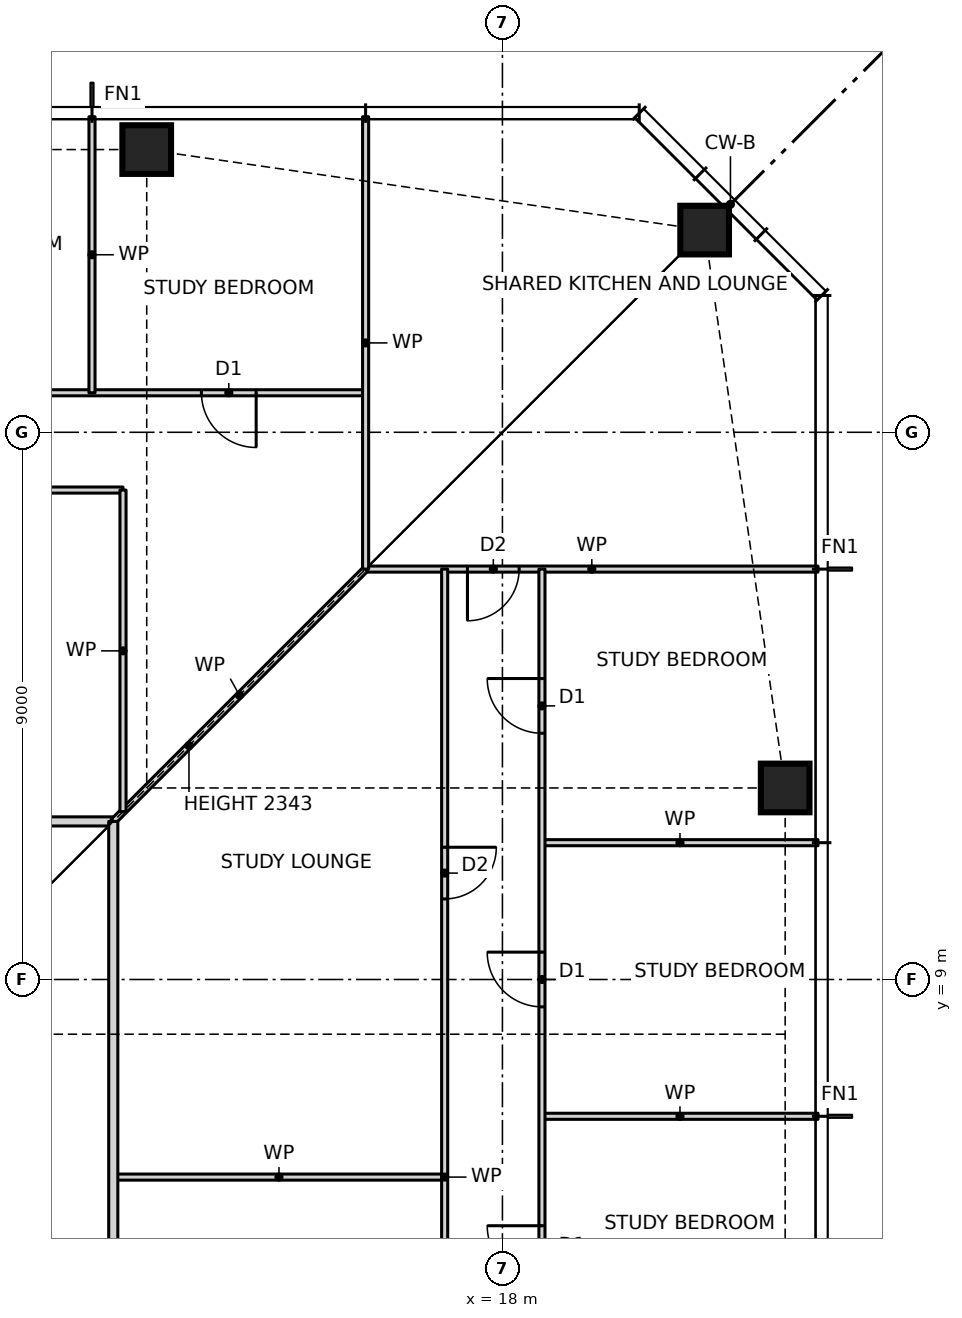
"""IFC4 building model, lengths in metres.
Left out: names, types, materials, properties, quantities, classifications, styles, units other than length and angle.
Written with IfcOpenShell. Run it as: python <this file> out.ifc"""

import sys

from ifc_helpers import new_model, si_unit, direction, frame, frame_2d, origin, origin_2d, place, context, subcontext, project, spatial, rectangle, hollow_rectangle, extrude, element, fill, save


model = new_model("IFC4")
c1 = context("Model", 3, precision=1e-05, world=origin(), true_north=direction((0.0, 1.0)))
c2 = subcontext(c1, "Body", "Model", "MODEL_VIEW")
j1 = project(units=[si_unit("LENGTHUNIT", "METRE"), si_unit("PLANEANGLEUNIT", "RADIAN")], contexts=[c1])
p1 = place(None, origin())
s1 = spatial("IfcSite", under=j1, at=p1, CompositionType="ELEMENT")
p2 = place(p1, origin())
s2 = spatial("IfcBuilding", under=s1, at=p2, CompositionType="ELEMENT")
p3 = place(p2, frame((0.0, 0.0, 50.0)))
s3 = spatial("IfcBuildingStorey", under=s2, at=p3, CompositionType="ELEMENT", Elevation=50.0)
for number, where, z_axis, x_axis in (
    (1, (22.65, 12.15, 0.0), (0.0, 0.0, 1.0), (1.0, 0.0, 0.0)),
    (2, (21.326, 21.326, 0.0), (0.0, 0.0, 1.0), (1.0, 0.0, 0.0)),
    (3, (12.15, 22.65, 0.0), (0.0, 0.0, 1.0), (1.0, 0.0, 0.0)),
):
    element("IfcColumn", number, at=place(p3, frame(where, z_axis=z_axis, x_axis=x_axis)), inside=s3, PredefinedType="COLUMN", context=c2, shape_type="SweptSolid", body=[
        extrude(hollow_rectangle(XDim=0.8, YDim=0.8, WallThickness=0.09, at=origin_2d()), origin(), (0.0, 0.0, 1.0), 3.5),
    ])
p4 = place(p3, frame((11.6, 5.75, 0.0), z_axis=(0.0, 0.0, 1.0), x_axis=(1.0, 0.0, 0.0)))
e4 = element("IfcWall", 4, at=p4, inside=s3, PredefinedType="PARTITIONING", context=c2, shape_type="SweptSolid", body=[
    extrude(rectangle(XDim=5.45, YDim=0.1, at=frame_2d((2.725, 0.0))), origin(), (0.0, 0.0, 1.0), 3.27),
])
for number, where, z_axis, x_axis in (
    (5, (18.65, 6.75, 0.0), (0.0, 0.0, 1.0), (1.0, 0.0, 0.0)),
    (6, (18.65, 11.25, 0.0), (0.0, 0.0, 1.0), (1.0, 0.0, 0.0)),
):
    element("IfcWall", number, at=place(p3, frame(where, z_axis=z_axis, x_axis=x_axis)), inside=s3, PredefinedType="PARTITIONING", context=c2, shape_type="SweptSolid", body=[
        extrude(rectangle(XDim=4.54, YDim=0.1, at=frame_2d((2.27, 0.0))), origin(), (0.0, 0.0, 1.0), 3.27),
    ])
p5 = place(p3, frame((-12.6, 11.6, 0.0), z_axis=(0.0, 0.0, 1.0), x_axis=(1.0, 0.0, 0.0)))
e7 = element("IfcWall", 7, at=p5, inside=s3, PredefinedType="PARTITIONING", context=c2, shape_type="SweptSolid", body=[
    extrude(rectangle(XDim=24.2, YDim=0.15, at=frame_2d((12.1, 0.0))), origin(), (0.0, 0.0, 1.0), 3.27),
])
p6 = place(p5, frame((7.15, 0.0, 0.0)))
e8 = element("IfcOpeningElement", 8, at=p6, cuts=e7, PredefinedType="OPENING", context=c2, shape_type="SweptSolid", body=[
    extrude(rectangle(XDim=1.0, YDim=2.1, at=frame_2d((0.5, 1.05))), frame((0.0, 0.085, 0.0), z_axis=(0.0, -1.0, 0.0), x_axis=(1.0, 0.0, 0.0)), (0.0, 0.0, 1.0), 0.17),
])
p7 = place(p3, frame((15.75, 15.75, 0.0), z_axis=(0.0, 0.0, 1.0), x_axis=(1.0, 0.0, 0.0)))
e9 = element("IfcWall", 9, at=p7, inside=s3, PredefinedType="PARTITIONING", context=c2, shape_type="SweptSolid", body=[
    extrude(rectangle(XDim=7.44, YDim=0.1, at=frame_2d((3.72, 0.0))), origin(), (0.0, 0.0, 1.0), 3.27),
])
p8 = place(p7, frame((1.675, 0.0, 0.0)))
e10 = element("IfcOpeningElement", 10, at=p8, cuts=e9, PredefinedType="OPENING", context=c2, shape_type="SweptSolid", body=[
    extrude(rectangle(XDim=0.85, YDim=2.1, at=frame_2d((0.425, 1.05))), frame((0.0, 0.06, 0.0), z_axis=(0.0, -1.0, 0.0), x_axis=(1.0, 0.0, 0.0)), (0.0, 0.0, 1.0), 0.12),
])
p9 = place(p3, frame((-3.75, 17.05, 0.0), z_axis=(0.0, 0.0, 1.0), x_axis=(1.0, 0.0, 0.0)))
e11 = element("IfcWall", 11, at=p9, inside=s3, PredefinedType="PARTITIONING", context=c2, shape_type="SweptSolid", body=[
    extrude(rectangle(XDim=15.51, YDim=0.1, at=frame_2d((7.755, 0.0))), origin(), (0.0, 0.0, 1.0), 3.27),
])
p10 = place(p9, frame((7.33, 0.0, 0.0)))
e12 = element("IfcOpeningElement", 12, at=p10, cuts=e11, PredefinedType="OPENING", context=c2, shape_type="SweptSolid", body=[
    extrude(rectangle(XDim=0.85, YDim=2.1, at=frame_2d((0.425, 1.05))), frame((0.0, 0.06, 0.0), z_axis=(0.0, -1.0, 0.0), x_axis=(1.0, 0.0, 0.0)), (0.0, 0.0, 1.0), 0.12),
])
p11 = place(p3, frame((-11.25, 18.65, 0.0), z_axis=(0.0, 0.0, 1.0), x_axis=(1.0, 0.0, 0.0)))
e13 = element("IfcWall", 13, at=p11, inside=s3, PredefinedType="PARTITIONING", context=c2, shape_type="SweptSolid", body=[
    extrude(rectangle(XDim=27.0, YDim=0.1, at=frame_2d((13.5, 0.0))), origin(), (0.0, 0.0, 1.0), 3.27),
])
p12 = place(p11, frame((24.3, 0.0, 0.0)))
e14 = element("IfcOpeningElement", 14, at=p12, cuts=e13, PredefinedType="OPENING", context=c2, shape_type="SweptSolid", body=[
    extrude(rectangle(XDim=0.9, YDim=2.1, at=frame_2d((0.45, 1.05))), frame((0.0, 0.06, 0.0), z_axis=(0.0, -1.0, 0.0), x_axis=(1.0, 0.0, 0.0)), (0.0, 0.0, 1.0), 0.12),
])
p13 = place(p11, frame((19.8, 0.0, 0.0)))
e15 = element("IfcOpeningElement", 15, at=p13, cuts=e13, PredefinedType="OPENING", context=c2, shape_type="SweptSolid", body=[
    extrude(rectangle(XDim=0.9, YDim=2.1, at=frame_2d((0.45, 1.05))), frame((0.0, 0.06, 0.0), z_axis=(0.0, -1.0, 0.0), x_axis=(1.0, 0.0, 0.0)), (0.0, 0.0, 1.0), 0.12),
])
p14 = place(p11, frame((15.3, 0.0, 0.0)))
e16 = element("IfcOpeningElement", 16, at=p14, cuts=e13, PredefinedType="OPENING", context=c2, shape_type="SweptSolid", body=[
    extrude(rectangle(XDim=0.9, YDim=2.1, at=frame_2d((0.45, 1.05))), frame((0.0, 0.06, 0.0), z_axis=(0.0, -1.0, 0.0), x_axis=(1.0, 0.0, 0.0)), (0.0, 0.0, 1.0), 0.12),
])
p15 = place(p11, frame((10.8, 0.0, 0.0)))
e17 = element("IfcOpeningElement", 17, at=p15, cuts=e13, PredefinedType="OPENING", context=c2, shape_type="SweptSolid", body=[
    extrude(rectangle(XDim=0.9, YDim=2.1, at=frame_2d((0.45, 1.05))), frame((0.0, 0.06, 0.0), z_axis=(0.0, -1.0, 0.0), x_axis=(1.0, 0.0, 0.0)), (0.0, 0.0, 1.0), 0.12),
])
p16 = place(p11, frame((6.3, 0.0, 0.0)))
e18 = element("IfcOpeningElement", 18, at=p16, cuts=e13, PredefinedType="OPENING", context=c2, shape_type="SweptSolid", body=[
    extrude(rectangle(XDim=0.9, YDim=2.1, at=frame_2d((0.45, 1.05))), frame((0.0, 0.06, 0.0), z_axis=(0.0, -1.0, 0.0), x_axis=(1.0, 0.0, 0.0)), (0.0, 0.0, 1.0), 0.12),
])
p17 = place(p11, frame((1.8, 0.0, 0.0)))
e19 = element("IfcOpeningElement", 19, at=p17, cuts=e13, PredefinedType="OPENING", context=c2, shape_type="SweptSolid", body=[
    extrude(rectangle(XDim=0.9, YDim=2.1, at=frame_2d((0.45, 1.05))), frame((0.0, 0.06, 0.0), z_axis=(0.0, -1.0, 0.0), x_axis=(1.0, 0.0, 0.0)), (0.0, 0.0, 1.0), 0.12),
])
p18 = place(p3, frame((11.6, 11.6, 0.0), z_axis=(0.0, 0.0, 1.0), x_axis=(0.707106781187, 0.707106781187, 0.0)))
e20 = element("IfcWall", 20, at=p18, inside=s3, PredefinedType="PARTITIONING", context=c2, shape_type="SweptSolid", body=[
    extrude(rectangle(XDim=5.869, YDim=0.1, at=frame_2d((2.935, 0.0))), origin(), (0.0, 0.0, 1.0), 2.343),
])
p19 = place(p3, frame((18.65, -15.75, 0.0), z_axis=(0.0, 0.0, 1.0), x_axis=(0.0, 1.0, 0.0)))
e21 = element("IfcWall", 21, at=p19, inside=s3, PredefinedType="PARTITIONING", context=c2, shape_type="SweptSolid", body=[
    extrude(rectangle(XDim=31.5, YDim=0.1, at=frame_2d((15.75, 0.0))), origin(), (0.0, 0.0, 1.0), 3.27),
])
p20 = place(p19, frame((1.8, 0.0, 0.0)))
e22 = element("IfcOpeningElement", 22, at=p20, cuts=e21, PredefinedType="OPENING", context=c2, shape_type="SweptSolid", body=[
    extrude(rectangle(XDim=0.9, YDim=2.1, at=frame_2d((0.45, 1.05))), frame((0.0, 0.06, 0.0), z_axis=(0.0, -1.0, 0.0), x_axis=(1.0, 0.0, 0.0)), (0.0, 0.0, 1.0), 0.12),
])
p21 = place(p19, frame((6.3, 0.0, 0.0)))
e23 = element("IfcOpeningElement", 23, at=p21, cuts=e21, PredefinedType="OPENING", context=c2, shape_type="SweptSolid", body=[
    extrude(rectangle(XDim=0.9, YDim=2.1, at=frame_2d((0.45, 1.05))), frame((0.0, 0.06, 0.0), z_axis=(0.0, -1.0, 0.0), x_axis=(1.0, 0.0, 0.0)), (0.0, 0.0, 1.0), 0.12),
])
p22 = place(p19, frame((10.8, 0.0, 0.0)))
e24 = element("IfcOpeningElement", 24, at=p22, cuts=e21, PredefinedType="OPENING", context=c2, shape_type="SweptSolid", body=[
    extrude(rectangle(XDim=0.9, YDim=2.1, at=frame_2d((0.45, 1.05))), frame((0.0, 0.06, 0.0), z_axis=(0.0, -1.0, 0.0), x_axis=(1.0, 0.0, 0.0)), (0.0, 0.0, 1.0), 0.12),
])
p23 = place(p19, frame((15.3, 0.0, 0.0)))
e25 = element("IfcOpeningElement", 25, at=p23, cuts=e21, PredefinedType="OPENING", context=c2, shape_type="SweptSolid", body=[
    extrude(rectangle(XDim=0.9, YDim=2.1, at=frame_2d((0.45, 1.05))), frame((0.0, 0.06, 0.0), z_axis=(0.0, -1.0, 0.0), x_axis=(1.0, 0.0, 0.0)), (0.0, 0.0, 1.0), 0.12),
])
p24 = place(p19, frame((19.8, 0.0, 0.0)))
e26 = element("IfcOpeningElement", 26, at=p24, cuts=e21, PredefinedType="OPENING", context=c2, shape_type="SweptSolid", body=[
    extrude(rectangle(XDim=0.9, YDim=2.1, at=frame_2d((0.45, 1.05))), frame((0.0, 0.06, 0.0), z_axis=(0.0, -1.0, 0.0), x_axis=(1.0, 0.0, 0.0)), (0.0, 0.0, 1.0), 0.12),
])
p25 = place(p19, frame((24.3, 0.0, 0.0)))
e27 = element("IfcOpeningElement", 27, at=p25, cuts=e21, PredefinedType="OPENING", context=c2, shape_type="SweptSolid", body=[
    extrude(rectangle(XDim=0.9, YDim=2.1, at=frame_2d((0.45, 1.05))), frame((0.0, 0.06, 0.0), z_axis=(0.0, -1.0, 0.0), x_axis=(1.0, 0.0, 0.0)), (0.0, 0.0, 1.0), 0.12),
])
p26 = place(p19, frame((28.8, 0.0, 0.0)))
e28 = element("IfcOpeningElement", 28, at=p26, cuts=e21, PredefinedType="OPENING", context=c2, shape_type="SweptSolid", body=[
    extrude(rectangle(XDim=0.9, YDim=2.1, at=frame_2d((0.45, 1.05))), frame((0.0, 0.06, 0.0), z_axis=(0.0, -1.0, 0.0), x_axis=(1.0, 0.0, 0.0)), (0.0, 0.0, 1.0), 0.12),
])
p27 = place(p3, frame((17.05, -4.25, 0.0), z_axis=(0.0, 0.0, 1.0), x_axis=(0.0, 1.0, 0.0)))
e29 = element("IfcWall", 29, at=p27, inside=s3, PredefinedType="PARTITIONING", context=c2, shape_type="SweptSolid", body=[
    extrude(rectangle(XDim=20.0, YDim=0.1, at=frame_2d((10.0, 0.0))), origin(), (0.0, 0.0, 1.0), 3.27),
])
p28 = place(p27, frame((4.575, 0.0, 0.0)))
e30 = element("IfcOpeningElement", 30, at=p28, cuts=e29, PredefinedType="OPENING", context=c2, shape_type="SweptSolid", body=[
    extrude(rectangle(XDim=0.85, YDim=2.1, at=frame_2d((0.425, 1.05))), frame((0.0, 0.06, 0.0), z_axis=(0.0, -1.0, 0.0), x_axis=(1.0, 0.0, 0.0)), (0.0, 0.0, 1.0), 0.12),
])
p29 = place(p27, frame((14.575, 0.0, 0.0)))
e31 = element("IfcOpeningElement", 31, at=p29, cuts=e29, PredefinedType="OPENING", context=c2, shape_type="SweptSolid", body=[
    extrude(rectangle(XDim=0.85, YDim=2.1, at=frame_2d((0.425, 1.05))), frame((0.0, 0.06, 0.0), z_axis=(0.0, -1.0, 0.0), x_axis=(1.0, 0.0, 0.0)), (0.0, 0.0, 1.0), 0.12),
])
p30 = place(p3, frame((15.75, 15.75, 0.0), z_axis=(0.0, 0.0, 1.0), x_axis=(0.0, 1.0, 0.0)))
e32 = element("IfcWall", 32, at=p30, inside=s3, PredefinedType="PARTITIONING", context=c2, shape_type="SweptSolid", body=[
    extrude(rectangle(XDim=7.44, YDim=0.1, at=frame_2d((3.72, 0.0))), origin(), (0.0, 0.0, 1.0), 3.27),
])
p31 = place(p3, frame((11.76, 11.76, 0.0), z_axis=(0.0, 0.0, 1.0), x_axis=(0.0, 1.0, 0.0)))
e33 = element("IfcWall", 33, at=p31, inside=s3, PredefinedType="PARTITIONING", context=c2, shape_type="SweptSolid", body=[
    extrude(rectangle(XDim=5.29, YDim=0.1, at=frame_2d((2.645, 0.0))), origin(), (0.0, 0.0, 1.0), 3.27),
])
p32 = place(p3, frame((11.6, -11.6, 0.0), z_axis=(0.0, 0.0, 1.0), x_axis=(0.0, 1.0, 0.0)))
e34 = element("IfcWall", 34, at=p32, inside=s3, PredefinedType="PARTITIONING", context=c2, shape_type="SweptSolid", body=[
    extrude(rectangle(XDim=23.2, YDim=0.15, at=frame_2d((11.6, 0.0))), origin(), (0.0, 0.0, 1.0), 3.27),
])
p33 = place(p32, frame((1.65, 0.0, 0.0)))
e35 = element("IfcOpeningElement", 35, at=p33, cuts=e34, PredefinedType="OPENING", context=c2, shape_type="SweptSolid", body=[
    extrude(rectangle(XDim=1.0, YDim=2.1, at=frame_2d((0.5, 1.05))), frame((0.0, 0.085, 0.0), z_axis=(0.0, -1.0, 0.0), x_axis=(1.0, 0.0, 0.0)), (0.0, 0.0, 1.0), 0.17),
])
p34 = place(p32, frame((3.8, 0.0, 0.0)))
e36 = element("IfcOpeningElement", 36, at=p34, cuts=e34, PredefinedType="OPENING", context=c2, shape_type="SweptSolid", body=[
    extrude(rectangle(XDim=0.9, YDim=2.1, at=frame_2d((0.45, 1.05))), frame((0.0, 0.085, 0.0), z_axis=(0.0, -1.0, 0.0), x_axis=(1.0, 0.0, 0.0)), (0.0, 0.0, 1.0), 0.17),
])
p35 = place(p3, frame((11.25, 18.65, 0.0), z_axis=(0.0, 0.0, 1.0), x_axis=(0.0, 1.0, 0.0)))
e37 = element("IfcWall", 37, at=p35, inside=s3, PredefinedType="PARTITIONING", context=c2, shape_type="SweptSolid", body=[
    extrude(rectangle(XDim=4.54, YDim=0.1, at=frame_2d((2.27, 0.0))), origin(), (0.0, 0.0, 1.0), 3.27),
])
p36 = place(p24, origin())
e38 = element("IfcDoor", 38, at=p36, inside=s3, OperationType="SINGLE_SWING_RIGHT", PredefinedType="DOOR", context=c2, shape_type="SweptSolid", body=[
    extrude(rectangle(XDim=0.9, YDim=2.1, at=frame_2d((0.45, 1.05))), frame((0.0, 0.025, 0.0), z_axis=(0.0, -1.0, 0.0), x_axis=(1.0, 0.0, 0.0)), (0.0, 0.0, 1.0), 0.05),
])
fill(e26, e38)
p37 = place(p25, origin())
e39 = element("IfcDoor", 39, at=p37, inside=s3, OperationType="SINGLE_SWING_RIGHT", PredefinedType="DOOR", context=c2, shape_type="SweptSolid", body=[
    extrude(rectangle(XDim=0.9, YDim=2.1, at=frame_2d((0.45, 1.05))), frame((0.0, 0.025, 0.0), z_axis=(0.0, -1.0, 0.0), x_axis=(1.0, 0.0, 0.0)), (0.0, 0.0, 1.0), 0.05),
])
fill(e27, e39)
p38 = place(p26, origin())
e40 = element("IfcDoor", 40, at=p38, inside=s3, OperationType="SINGLE_SWING_RIGHT", PredefinedType="DOOR", context=c2, shape_type="SweptSolid", body=[
    extrude(rectangle(XDim=0.9, YDim=2.1, at=frame_2d((0.45, 1.05))), frame((0.0, 0.025, 0.0), z_axis=(0.0, -1.0, 0.0), x_axis=(1.0, 0.0, 0.0)), (0.0, 0.0, 1.0), 0.05),
])
fill(e28, e40)
p39 = place(p29, frame((0.85, 0.0, 0.0), z_axis=(0.0, 0.0, 1.0), x_axis=(-1.0, 0.0, 0.0)))
e41 = element("IfcDoor", 41, at=p39, inside=s3, OperationType="SINGLE_SWING_LEFT", PredefinedType="DOOR", context=c2, shape_type="SweptSolid", body=[
    extrude(rectangle(XDim=0.85, YDim=2.1, at=frame_2d((0.425, 1.05))), frame((0.0, 0.025, 0.0), z_axis=(0.0, -1.0, 0.0), x_axis=(1.0, 0.0, 0.0)), (0.0, 0.0, 1.0), 0.05),
])
fill(e31, e41)
p40 = place(p12, frame((0.9, 0.0, 0.0), z_axis=(0.0, 0.0, 1.0), x_axis=(-1.0, 0.0, 0.0)))
e42 = element("IfcDoor", 42, at=p40, inside=s3, OperationType="SINGLE_SWING_LEFT", PredefinedType="DOOR", context=c2, shape_type="SweptSolid", body=[
    extrude(rectangle(XDim=0.9, YDim=2.1, at=frame_2d((0.45, 1.05))), frame((0.0, 0.025, 0.0), z_axis=(0.0, -1.0, 0.0), x_axis=(1.0, 0.0, 0.0)), (0.0, 0.0, 1.0), 0.05),
])
fill(e14, e42)
p41 = place(p8, frame((0.85, 0.0, 0.0), z_axis=(0.0, 0.0, 1.0), x_axis=(-1.0, 0.0, 0.0)))
e43 = element("IfcDoor", 43, at=p41, inside=s3, OperationType="SINGLE_SWING_RIGHT", PredefinedType="DOOR", context=c2, shape_type="SweptSolid", body=[
    extrude(rectangle(XDim=0.85, YDim=2.1, at=frame_2d((0.425, 1.05))), frame((0.0, 0.025, 0.0), z_axis=(0.0, -1.0, 0.0), x_axis=(1.0, 0.0, 0.0)), (0.0, 0.0, 1.0), 0.05),
])
fill(e10, e43)
save(model, sys.argv[1])
